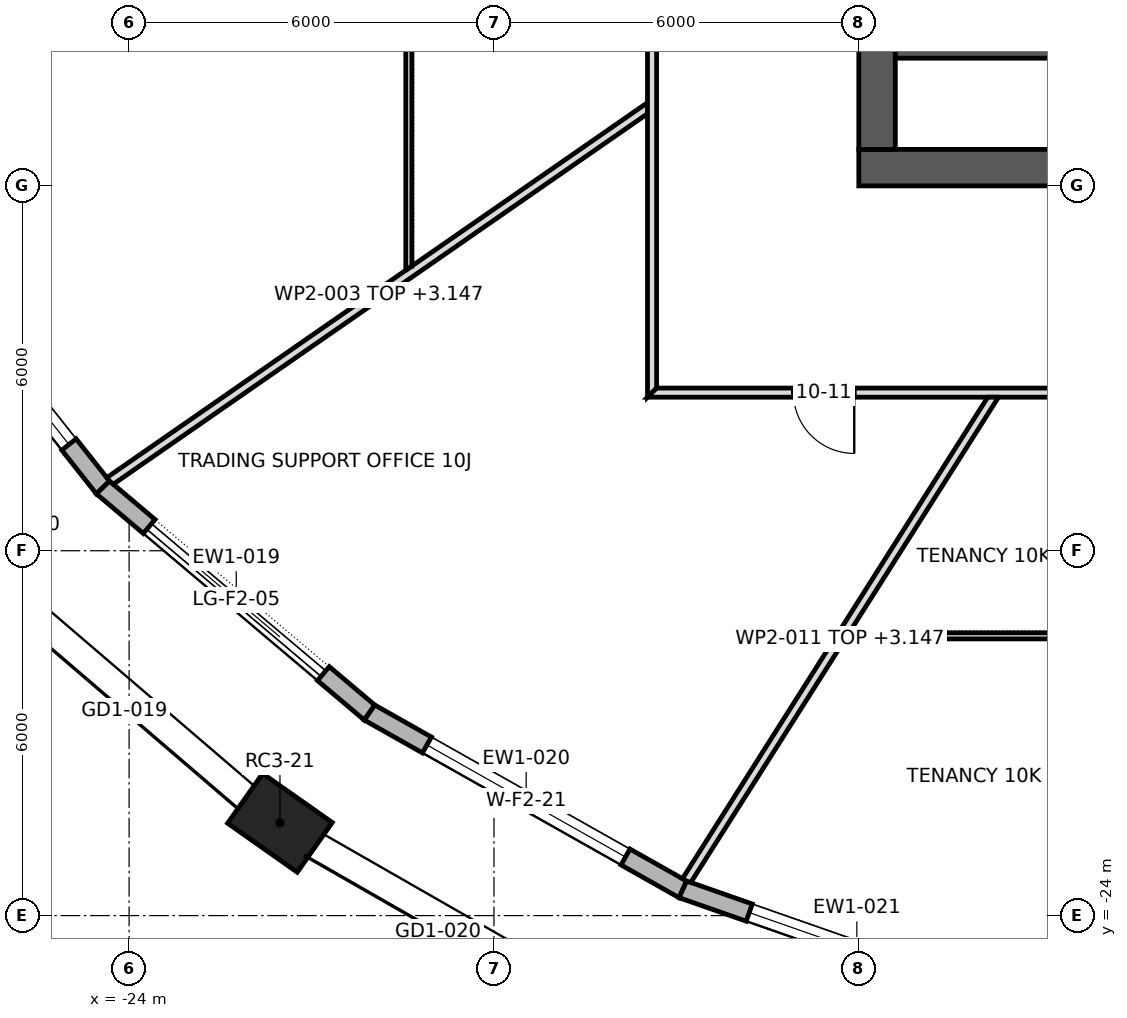
"""IFC4 building model, lengths in metres.
Left out: names, types, materials, properties, quantities, classifications, styles, units other than length and angle.
Written with IfcOpenShell. Run it as: python <this file> out.ifc"""

import sys

from ifc_helpers import new_model, si_unit, direction, frame, frame_2d, origin, origin_2d, place, context, subcontext, project, spatial, polyline, rectangle, outline, extrude, element, fill, save


model = new_model("IFC4")
c1 = context("Model", 3, precision=1e-05, world=origin(), true_north=direction((0.0, 1.0)))
c2 = subcontext(c1, "Body", "Model", "MODEL_VIEW")
j1 = project(units=[si_unit("LENGTHUNIT", "METRE"), si_unit("PLANEANGLEUNIT", "RADIAN")], contexts=[c1])
p1 = place(None, origin())
s1 = spatial("IfcSite", under=j1, at=p1, CompositionType="ELEMENT")
p2 = place(p1, origin())
s2 = spatial("IfcBuilding", under=s1, at=p2, CompositionType="ELEMENT")
p3 = place(p2, frame((0.0, 0.0, 150.7)))
s3 = spatial("IfcBuildingStorey", under=s2, at=p3, CompositionType="ELEMENT", Elevation=150.7)
p4 = place(p3, frame((-21.519, -22.475, 0.0), z_axis=(0.0, 0.0, 1.0), x_axis=(0.817910796357, -0.575345052297, 0.0)))
e1 = element("IfcColumn", 1, at=p4, inside=s3, PredefinedType="COLUMN", context=c2, shape_type="SweptSolid", body=[
    extrude(rectangle(XDim=1.4, YDim=1.0, at=origin_2d()), origin(), (0.0, 0.0, 1.0), 4.2),
])
p5 = place(p3, frame((-12.0, -11.7, 0.0), z_axis=(0.0, 0.0, 1.0), x_axis=(1.0, 0.0, 0.0)))
e2 = element("IfcWall", 2, at=p5, inside=s3, PredefinedType="SHEAR", context=c2, shape_type="SweptSolid", body=[
    extrude(rectangle(XDim=24.0, YDim=0.6, at=frame_2d((12.0, 0.0))), origin(), (0.0, 0.0, 1.0), 4.2),
])
p6 = place(p5, frame((9.975, 0.0, 0.0)))
e3 = element("IfcOpeningElement", 3, at=p6, cuts=e2, PredefinedType="OPENING", context=c2, shape_type="SweptSolid", body=[
    extrude(rectangle(XDim=0.9, YDim=2.1, at=frame_2d((0.45, 1.05))), frame((0.0, 0.312, 0.0), z_axis=(0.0, -1.0, 0.0), x_axis=(1.0, 0.0, 0.0)), (0.0, 0.0, 1.0), 0.624),
])
p7 = place(p5, frame((3.8, 0.0, 0.0)))
e4 = element("IfcOpeningElement", 4, at=p7, cuts=e2, PredefinedType="OPENING", context=c2, shape_type="SweptSolid", body=[
    extrude(rectangle(XDim=0.8, YDim=2.1, at=frame_2d((0.4, 1.05))), frame((0.0, 0.312, 0.0), z_axis=(0.0, -1.0, 0.0), x_axis=(1.0, 0.0, 0.0)), (0.0, 0.0, 1.0), 0.624),
])
p8 = place(p5, frame((5.8, 0.0, 0.0)))
e5 = element("IfcOpeningElement", 5, at=p8, cuts=e2, PredefinedType="OPENING", context=c2, shape_type="SweptSolid", body=[
    extrude(rectangle(XDim=0.8, YDim=2.1, at=frame_2d((0.4, 1.05))), frame((0.0, 0.312, 0.0), z_axis=(0.0, -1.0, 0.0), x_axis=(1.0, 0.0, 0.0)), (0.0, 0.0, 1.0), 0.624),
])
p9 = place(p5, frame((7.5, 0.0, 0.0)))
e6 = element("IfcOpeningElement", 6, at=p9, cuts=e2, PredefinedType="OPENING", context=c2, shape_type="SweptSolid", body=[
    extrude(rectangle(XDim=0.8, YDim=2.1, at=frame_2d((0.4, 1.05))), frame((0.0, 0.312, 0.0), z_axis=(0.0, -1.0, 0.0), x_axis=(1.0, 0.0, 0.0)), (0.0, 0.0, 1.0), 0.624),
])
p10 = place(p5, frame((15.85, 0.0, 0.0)))
e7 = element("IfcOpeningElement", 7, at=p10, cuts=e2, PredefinedType="OPENING", context=c2, shape_type="SweptSolid", body=[
    extrude(rectangle(XDim=0.8, YDim=2.1, at=frame_2d((0.4, 1.05))), frame((0.0, 0.312, 0.0), z_axis=(0.0, -1.0, 0.0), x_axis=(1.0, 0.0, 0.0)), (0.0, 0.0, 1.0), 0.624),
])
p11 = place(p3, frame((-11.7, -11.4, 0.0), z_axis=(0.0, 0.0, 1.0), x_axis=(0.0, 1.0, 0.0)))
e8 = element("IfcWall", 8, at=p11, inside=s3, PredefinedType="SHEAR", context=c2, shape_type="SweptSolid", body=[
    extrude(rectangle(XDim=22.8, YDim=0.6, at=frame_2d((11.4, 0.0))), origin(), (0.0, 0.0, 1.0), 4.2),
])
p12 = place(p11, frame((10.2, 0.0, 0.0)))
e9 = element("IfcOpeningElement", 9, at=p12, cuts=e8, PredefinedType="OPENING", context=c2, shape_type="SweptSolid", body=[
    extrude(rectangle(XDim=2.4, YDim=2.1, at=frame_2d((1.2, 1.05))), frame((0.0, 0.312, 0.0), z_axis=(0.0, -1.0, 0.0), x_axis=(1.0, 0.0, 0.0)), (0.0, 0.0, 1.0), 0.624),
])
p13 = place(p11, frame((18.925, 0.0, 0.0)))
e10 = element("IfcOpeningElement", 10, at=p13, cuts=e8, PredefinedType="OPENING", context=c2, shape_type="SweptSolid", body=[
    extrude(rectangle(XDim=1.2, YDim=2.1, at=frame_2d((0.6, 1.05))), frame((0.0, 0.312, 0.0), z_axis=(0.0, -1.0, 0.0), x_axis=(1.0, 0.0, 0.0)), (0.0, 0.0, 1.0), 0.624),
])
p14 = place(p11, frame((2.675, 0.0, 0.0)))
e11 = element("IfcOpeningElement", 11, at=p14, cuts=e8, PredefinedType="OPENING", context=c2, shape_type="SweptSolid", body=[
    extrude(rectangle(XDim=1.2, YDim=2.1, at=frame_2d((0.6, 1.05))), frame((0.0, 0.312, 0.0), z_axis=(0.0, -1.0, 0.0), x_axis=(1.0, 0.0, 0.0)), (0.0, 0.0, 1.0), 0.624),
])
p15 = place(p3, frame((-27.876, -12.605, 0.0), z_axis=(0.0, 0.0, 1.0), x_axis=(0.620520511988, -0.784190215574, 0.0)))
e12 = element("IfcWall", 12, at=p15, inside=s3, PredefinedType="STANDARD", context=c2, shape_type="SweptSolid", body=[
    extrude(outline(polyline([(-0.016, -0.15), (5.569, -0.15), (5.538, 0.15), (0.016, 0.15), (-0.016, -0.15)])), origin(), (0.0, 0.0, 1.0), 3.9),
])
p16 = place(p15, frame((0.902, 0.0, 0.6)))
e13 = element("IfcOpeningElement", 13, at=p16, cuts=e12, PredefinedType="OPENING", context=c2, shape_type="SweptSolid", body=[
    extrude(rectangle(XDim=3.75, YDim=2.85, at=frame_2d((1.875, 1.425))), frame((0.0, 0.162, 0.0), z_axis=(0.0, -1.0, 0.0), x_axis=(1.0, 0.0, 0.0)), (0.0, 0.0, 1.0), 0.324),
])
p17 = place(p3, frame((-24.43, -16.96, 0.0), z_axis=(0.0, 0.0, 1.0), x_axis=(0.764047627809, -0.64515984255, 0.0)))
e14 = element("IfcWall", 14, at=p17, inside=s3, PredefinedType="STANDARD", context=c2, shape_type="SweptSolid", body=[
    extrude(outline(polyline([(-0.015, -0.15), (5.752, -0.15), (5.723, 0.15), (0.015, 0.15), (-0.015, -0.15)])), origin(), (0.0, 0.0, 1.0), 3.9),
])
p18 = place(p17, frame((0.994, 0.0, 0.0)))
e15 = element("IfcOpeningElement", 15, at=p18, cuts=e14, PredefinedType="OPENING", context=c2, shape_type="SweptSolid", body=[
    extrude(rectangle(XDim=3.75, YDim=3.45, at=frame_2d((1.875, 1.725))), frame((0.0, 0.162, 0.0), z_axis=(0.0, -1.0, 0.0), x_axis=(1.0, 0.0, 0.0)), (0.0, 0.0, 1.0), 0.324),
])
p19 = place(p3, frame((-20.046, -20.661, 0.0), z_axis=(0.0, 0.0, 1.0), x_axis=(0.870912346166, -0.491438384028, 0.0)))
e16 = element("IfcWall", 16, at=p19, inside=s3, PredefinedType="STANDARD", context=c2, shape_type="SweptSolid", body=[
    extrude(outline(polyline([(-0.014, -0.15), (5.929, -0.15), (5.902, 0.15), (0.014, 0.15), (-0.014, -0.15)])), origin(), (0.0, 0.0, 1.0), 3.9),
])
p20 = place(p19, frame((1.083, 0.0, 0.6)))
e17 = element("IfcOpeningElement", 17, at=p20, cuts=e16, PredefinedType="OPENING", context=c2, shape_type="SweptSolid", body=[
    extrude(rectangle(XDim=3.75, YDim=2.85, at=frame_2d((1.875, 1.425))), frame((0.0, 0.162, 0.0), z_axis=(0.0, -1.0, 0.0), x_axis=(1.0, 0.0, 0.0)), (0.0, 0.0, 1.0), 0.324),
])
p21 = place(p3, frame((-14.894, -23.569, 0.0), z_axis=(0.0, 0.0, 1.0), x_axis=(0.943925510212, -0.330158494016, 0.0)))
e18 = element("IfcWall", 18, at=p21, inside=s3, PredefinedType="STANDARD", context=c2, shape_type="SweptSolid", body=[
    extrude(outline(polyline([(-0.013, -0.15), (6.076, -0.15), (6.05, 0.15), (0.013, 0.15), (-0.013, -0.15)])), origin(), (0.0, 0.0, 1.0), 3.9),
])
p22 = place(p21, frame((1.156, 0.0, 0.6)))
e19 = element("IfcOpeningElement", 19, at=p22, cuts=e18, PredefinedType="OPENING", context=c2, shape_type="SweptSolid", body=[
    extrude(rectangle(XDim=3.75, YDim=2.85, at=frame_2d((1.875, 1.425))), frame((0.0, 0.162, 0.0), z_axis=(0.0, -1.0, 0.0), x_axis=(1.0, 0.0, 0.0)), (0.0, 0.0, 1.0), 0.324),
])
p23 = place(p3, frame((-11.4, -9.825, 0.0), z_axis=(0.0, 0.0, 1.0), x_axis=(1.0, 0.0, 0.0)))
e20 = element("IfcWall", 20, at=p23, inside=s3, PredefinedType="SHEAR", context=c2, shape_type="SweptSolid", body=[
    extrude(rectangle(XDim=8.0, YDim=0.15, at=frame_2d((4.0, 0.0))), origin(), (0.0, 0.0, 1.0), 3.9),
])
p24 = place(p3, frame((-24.324, -16.859, 0.0), z_axis=(0.0, 0.0, 1.0), x_axis=(0.821700462415, 0.569919599652, 0.0)))
e21 = element("IfcWall", 21, at=p24, inside=s3, PredefinedType="PARTITIONING", context=c2, shape_type="SweptSolid", body=[
    extrude(outline(polyline([(0.025, -0.075), (1.807, -0.075), (3.589, -0.075), (5.371, -0.075), (7.153, -0.075), (8.935, -0.075), (10.717, -0.075), (10.82, 0.074), (10.82, 0.075), (9.249, 0.075), (7.677, 0.075), (6.105, 0.075), (6.104, 0.073), (6.102, 0.075), (4.576, 0.075), (3.051, 0.075), (1.525, 0.075), (0.0, 0.075), (0.0, 0.071), (0.004, 0.002), (0.025, -0.075)])), origin(), (0.0, 0.0, 1.0), 3.147),
])
p25 = place(p3, frame((-19.4, -13.387, 0.0), z_axis=(0.0, 0.0, 1.0), x_axis=(0.0, 1.0, 0.0)))
e22 = element("IfcWall", 22, at=p25, inside=s3, PredefinedType="PARTITIONING", context=c2, shape_type="SweptSolid", body=[
    extrude(outline(polyline([(11.703, -0.05), (11.703, -0.046), (11.695, 0.05), (10.028, 0.05), (8.361, 0.05), (8.354, 0.048), (8.353, 0.05), (6.682, 0.05), (5.012, 0.05), (3.341, 0.05), (1.671, 0.05), (0.0, 0.05), (0.0, 0.05), (0.069, -0.05), (2.008, -0.05), (3.947, -0.05), (5.886, -0.05), (7.825, -0.05), (9.764, -0.05), (11.703, -0.05)])), origin(), (0.0, 0.0, 1.0), 3.9),
])
p26 = place(p25, frame((3.732, 0.0, 0.0)))
e23 = element("IfcOpeningElement", 23, at=p26, cuts=e22, PredefinedType="OPENING", context=c2, shape_type="SweptSolid", body=[
    extrude(rectangle(XDim=0.9, YDim=2.1, at=frame_2d((0.45, 1.05))), frame((0.0, 0.062, 0.0), z_axis=(0.0, -1.0, 0.0), x_axis=(1.0, 0.0, 0.0)), (0.0, 0.0, 1.0), 0.124),
])
p27 = place(p3, frame((-15.4, -15.475, 0.0), z_axis=(0.0, 0.0, 1.0), x_axis=(0.0, 1.0, 0.0)))
e24 = element("IfcWall", 24, at=p27, inside=s3, PredefinedType="PARTITIONING", context=c2, shape_type="SweptSolid", body=[
    extrude(outline(polyline([(0.15, -0.075), (2.066, -0.075), (3.981, -0.075), (5.897, -0.075), (7.812, -0.075), (9.728, -0.075), (11.644, -0.075), (13.56, -0.075), (15.475, -0.075), (17.391, -0.075), (19.306, -0.075), (21.222, -0.075), (23.138, -0.075), (25.053, -0.075), (26.969, -0.075), (28.885, -0.075), (30.8, -0.075), (30.95, 0.075), (29.016, 0.075), (27.081, 0.075), (25.147, 0.075), (23.212, 0.075), (21.278, 0.075), (19.344, 0.075), (17.409, 0.075), (15.475, 0.075), (13.541, 0.075), (11.606, 0.075), (9.672, 0.075), (7.738, 0.075), (5.803, 0.075), (3.869, 0.075), (1.935, 0.075), (0.0, 0.075), (0.15, -0.075)])), origin(), (0.0, 0.0, 1.0), 3.9),
])
p28 = place(p27, frame((24.245, 0.0, 0.0)))
e25 = element("IfcOpeningElement", 25, at=p28, cuts=e24, PredefinedType="OPENING", context=c2, shape_type="SweptSolid", body=[
    extrude(rectangle(XDim=1.8, YDim=2.1, at=frame_2d((0.9, 1.05))), frame((0.0, 0.087, 0.0), z_axis=(0.0, -1.0, 0.0), x_axis=(1.0, 0.0, 0.0)), (0.0, 0.0, 1.0), 0.174),
])
p29 = place(p27, frame((16.305, 0.0, 0.0)))
e26 = element("IfcOpeningElement", 26, at=p29, cuts=e24, PredefinedType="OPENING", context=c2, shape_type="SweptSolid", body=[
    extrude(rectangle(XDim=1.0, YDim=2.1, at=frame_2d((0.5, 1.05))), frame((0.0, 0.087, 0.0), z_axis=(0.0, -1.0, 0.0), x_axis=(1.0, 0.0, 0.0)), (0.0, 0.0, 1.0), 0.174),
])
p30 = place(p27, frame((9.0, 0.0, 0.0)))
e27 = element("IfcOpeningElement", 27, at=p30, cuts=e24, PredefinedType="OPENING", context=c2, shape_type="SweptSolid", body=[
    extrude(rectangle(XDim=1.0, YDim=2.1, at=frame_2d((0.5, 1.05))), frame((0.0, 0.087, 0.0), z_axis=(0.0, -1.0, 0.0), x_axis=(1.0, 0.0, 0.0)), (0.0, 0.0, 1.0), 0.174),
])
p31 = place(p3, frame((-15.475, -15.4, 0.0), z_axis=(0.0, 0.0, 1.0), x_axis=(1.0, 0.0, 0.0)))
e28 = element("IfcWall", 28, at=p31, inside=s3, PredefinedType="PARTITIONING", context=c2, shape_type="SweptSolid", body=[
    extrude(outline(polyline([(0.0, -0.075), (1.935, -0.075), (3.869, -0.075), (5.803, -0.075), (7.738, -0.075), (9.672, -0.075), (11.606, -0.075), (13.541, -0.075), (15.475, -0.075), (17.409, -0.075), (19.344, -0.075), (21.278, -0.075), (23.212, -0.075), (25.147, -0.075), (27.081, -0.075), (29.016, -0.075), (30.95, -0.075), (30.8, 0.075), (28.885, 0.075), (26.969, 0.075), (25.053, 0.075), (23.138, 0.075), (21.222, 0.075), (19.306, 0.075), (17.391, 0.075), (15.475, 0.075), (13.56, 0.075), (11.644, 0.075), (9.728, 0.075), (7.812, 0.075), (5.897, 0.075), (3.981, 0.075), (2.066, 0.075), (0.15, 0.075), (0.0, -0.075)])), origin(), (0.0, 0.0, 1.0), 3.9),
])
p32 = place(p31, frame((2.4, 0.0, 0.0)))
e29 = element("IfcOpeningElement", 29, at=p32, cuts=e28, PredefinedType="OPENING", context=c2, shape_type="SweptSolid", body=[
    extrude(rectangle(XDim=1.0, YDim=2.1, at=frame_2d((0.5, 1.05))), frame((0.0, 0.087, 0.0), z_axis=(0.0, -1.0, 0.0), x_axis=(1.0, 0.0, 0.0)), (0.0, 0.0, 1.0), 0.174),
])
p33 = place(p31, frame((18.705, 0.0, 0.0)))
e30 = element("IfcOpeningElement", 30, at=p33, cuts=e28, PredefinedType="OPENING", context=c2, shape_type="SweptSolid", body=[
    extrude(rectangle(XDim=1.0, YDim=2.1, at=frame_2d((0.5, 1.05))), frame((0.0, 0.087, 0.0), z_axis=(0.0, -1.0, 0.0), x_axis=(1.0, 0.0, 0.0)), (0.0, 0.0, 1.0), 0.174),
])
p34 = place(p31, frame((13.535, 0.0, 0.0)))
e31 = element("IfcOpeningElement", 31, at=p34, cuts=e28, PredefinedType="OPENING", context=c2, shape_type="SweptSolid", body=[
    extrude(rectangle(XDim=1.0, YDim=2.1, at=frame_2d((0.5, 1.05))), frame((0.0, 0.087, 0.0), z_axis=(0.0, -1.0, 0.0), x_axis=(1.0, 0.0, 0.0)), (0.0, 0.0, 1.0), 0.174),
])
p35 = place(p31, frame((7.695, 0.0, 0.0)))
e32 = element("IfcOpeningElement", 32, at=p35, cuts=e28, PredefinedType="OPENING", context=c2, shape_type="SweptSolid", body=[
    extrude(rectangle(XDim=1.0, YDim=2.1, at=frame_2d((0.5, 1.05))), frame((0.0, 0.087, 0.0), z_axis=(0.0, -1.0, 0.0), x_axis=(1.0, 0.0, 0.0)), (0.0, 0.0, 1.0), 0.174),
])
p36 = place(p31, frame((25.04, 0.0, 0.0)))
e33 = element("IfcOpeningElement", 33, at=p36, cuts=e28, PredefinedType="OPENING", context=c2, shape_type="SweptSolid", body=[
    extrude(rectangle(XDim=1.8, YDim=2.1, at=frame_2d((0.9, 1.05))), frame((0.0, 0.087, 0.0), z_axis=(0.0, -1.0, 0.0), x_axis=(1.0, 0.0, 0.0)), (0.0, 0.0, 1.0), 0.174),
])
p37 = place(p3, frame((-14.837, -23.432, 0.0), z_axis=(0.0, 0.0, 1.0), x_axis=(0.535485065479, 0.844544696655, 0.0)))
e34 = element("IfcWall", 34, at=p37, inside=s3, PredefinedType="PARTITIONING", context=c2, shape_type="SweptSolid", body=[
    extrude(outline(polyline([(0.02, -0.075), (1.639, -0.075), (3.257, -0.075), (4.876, -0.075), (4.88, -0.073), (4.881, -0.075), (6.411, -0.075), (7.94, -0.075), (9.469, -0.075), (9.469, -0.074), (9.375, 0.075), (7.5, 0.075), (5.625, 0.075), (3.75, 0.075), (1.875, 0.075), (0.0, 0.075), (0.0, 0.066), (0.004, -0.004), (0.02, -0.075)])), origin(), (0.0, 0.0, 1.0), 3.147),
])
p38 = place(p3, frame((-12.222, -19.4, 0.0), z_axis=(0.0, 0.0, 1.0), x_axis=(1.0, 0.0, 0.0)))
e35 = element("IfcWall", 35, at=p38, inside=s3, PredefinedType="PARTITIONING", context=c2, shape_type="SweptSolid", body=[
    extrude(outline(polyline([(0.0, -0.05), (1.981, -0.05), (3.962, -0.05), (5.944, -0.05), (7.925, -0.05), (9.906, -0.05), (9.906, -0.049), (9.916, -0.05), (11.759, -0.05), (13.602, -0.05), (15.444, -0.05), (17.287, -0.05), (19.13, -0.05), (19.13, -0.05), (19.094, 0.05), (17.464, 0.05), (15.833, 0.05), (14.202, 0.05), (14.202, 0.05), (14.102, 0.05), (14.102, 0.05), (12.442, 0.05), (10.782, 0.05), (9.122, 0.05), (7.462, 0.05), (7.462, 0.05), (7.362, 0.05), (7.362, 0.05), (5.538, 0.05), (3.713, 0.05), (1.888, 0.05), (0.063, 0.05), (0.0, -0.049), (0.0, -0.05)])), origin(), (0.0, 0.0, 1.0), 3.9),
])
p39 = place(p38, frame((8.238, 0.0, 0.0)))
e36 = element("IfcOpeningElement", 36, at=p39, cuts=e35, PredefinedType="OPENING", context=c2, shape_type="SweptSolid", body=[
    extrude(rectangle(XDim=0.9, YDim=2.1, at=frame_2d((0.45, 1.05))), frame((0.0, 0.062, 0.0), z_axis=(0.0, -1.0, 0.0), x_axis=(1.0, 0.0, 0.0)), (0.0, 0.0, 1.0), 0.124),
])
p40 = place(p16, origin())
e37 = element("IfcWindow", 37, at=p40, inside=s3, PartitioningType="TRIPLE_PANEL_VERTICAL", PredefinedType="WINDOW", context=c2, shape_type="SweptSolid", body=[
    extrude(rectangle(XDim=3.75, YDim=2.85, at=frame_2d((1.875, 1.425))), frame((0.0, 0.03, 0.0), z_axis=(0.0, -1.0, 0.0), x_axis=(1.0, 0.0, 0.0)), (0.0, 0.0, 1.0), 0.06),
])
fill(e13, e37)
p41 = place(p18, origin())
e38 = element("IfcDoor", 38, at=p41, inside=s3, OperationType="DOUBLE_DOOR_SLIDING", PredefinedType="DOOR", context=c2, shape_type="SweptSolid", body=[
    extrude(rectangle(XDim=3.75, YDim=3.45, at=frame_2d((1.875, 1.725))), frame((0.0, 0.025, 0.0), z_axis=(0.0, -1.0, 0.0), x_axis=(1.0, 0.0, 0.0)), (0.0, 0.0, 1.0), 0.05),
])
fill(e15, e38)
p42 = place(p20, origin())
e39 = element("IfcWindow", 39, at=p42, inside=s3, PartitioningType="TRIPLE_PANEL_VERTICAL", PredefinedType="WINDOW", context=c2, shape_type="SweptSolid", body=[
    extrude(rectangle(XDim=3.75, YDim=2.85, at=frame_2d((1.875, 1.425))), frame((0.0, 0.03, 0.0), z_axis=(0.0, -1.0, 0.0), x_axis=(1.0, 0.0, 0.0)), (0.0, 0.0, 1.0), 0.06),
])
fill(e17, e39)
p43 = place(p22, origin())
e40 = element("IfcWindow", 40, at=p43, inside=s3, PartitioningType="TRIPLE_PANEL_VERTICAL", PredefinedType="WINDOW", context=c2, shape_type="SweptSolid", body=[
    extrude(rectangle(XDim=3.75, YDim=2.85, at=frame_2d((1.875, 1.425))), frame((0.0, 0.03, 0.0), z_axis=(0.0, -1.0, 0.0), x_axis=(1.0, 0.0, 0.0)), (0.0, 0.0, 1.0), 0.06),
])
fill(e19, e40)
p44 = place(p32, frame((1.0, 0.0, 0.0), z_axis=(0.0, 0.0, 1.0), x_axis=(-1.0, 0.0, 0.0)))
e41 = element("IfcDoor", 41, at=p44, inside=s3, OperationType="SINGLE_SWING_RIGHT", PredefinedType="DOOR", context=c2, shape_type="SweptSolid", body=[
    extrude(rectangle(XDim=1.0, YDim=2.1, at=frame_2d((0.5, 1.05))), frame((0.0, 0.025, 0.0), z_axis=(0.0, -1.0, 0.0), x_axis=(1.0, 0.0, 0.0)), (0.0, 0.0, 1.0), 0.05),
])
fill(e29, e41)
save(model, sys.argv[1])
